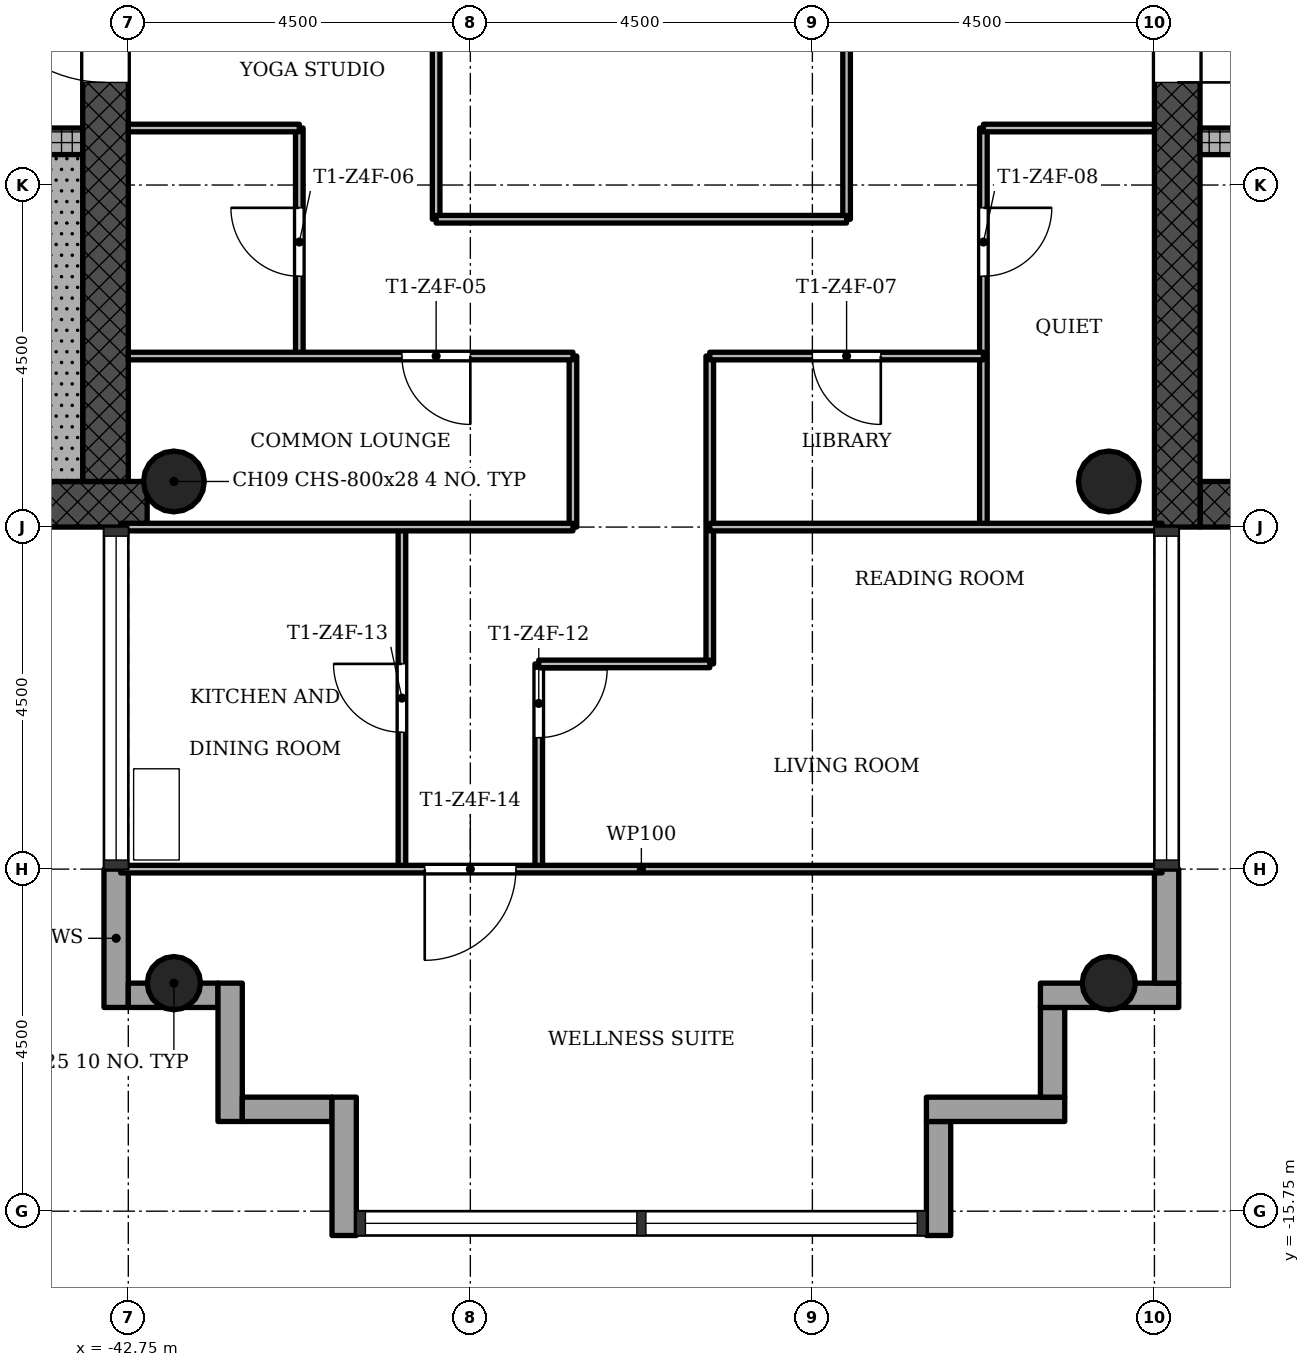
"""IFC4 building model, lengths in metres.
Left out: names, types, materials, properties, quantities, classifications, styles, units other than length and angle.
Written with IfcOpenShell. Run it as: python <this file> out.ifc"""

import sys

from ifc_helpers import new_model, si_unit, direction, frame, frame_2d, origin, origin_2d, place, context, subcontext, project, spatial, rectangle, hollow_circle, extrude, element, fill, save


model = new_model("IFC4")
c1 = context("Model", 3, precision=1e-05, world=origin(), true_north=direction((0.0, 1.0)))
c2 = subcontext(c1, "Body", "Model", "MODEL_VIEW")
j1 = project(units=[si_unit("LENGTHUNIT", "METRE"), si_unit("PLANEANGLEUNIT", "RADIAN")], contexts=[c1])
p1 = place(None, origin())
s1 = spatial("IfcSite", under=j1, at=p1, CompositionType="ELEMENT")
p2 = place(p1, origin())
s2 = spatial("IfcBuilding", under=s1, at=p2, CompositionType="ELEMENT")
p3 = place(p2, frame((0.0, 0.0, 223.2)))
s3 = spatial("IfcBuildingStorey", under=s2, at=p3, CompositionType="ELEMENT", Elevation=223.2)
p4 = place(p3, frame((-28.65, -6.45, 0.0), z_axis=(0.0, 0.0, 1.0), x_axis=(1.0, 0.0, 0.0)))
e1 = element("IfcWall", 1, at=p4, inside=s3, PredefinedType="SHEAR", context=c2, shape_type="SweptSolid", body=[
    extrude(rectangle(XDim=8.4, YDim=0.6, at=frame_2d((4.2, 0.0))), origin(), (0.0, 0.0, 1.0), 3.4),
])
p5 = place(p3, frame((-28.95, 6.15, 0.0), z_axis=(0.0, 0.0, 1.0), x_axis=(0.0, -1.0, 0.0)))
e2 = element("IfcWall", 2, at=p5, inside=s3, PredefinedType="SHEAR", context=c2, shape_type="SweptSolid", body=[
    extrude(rectangle(XDim=12.9, YDim=0.6, at=frame_2d((6.45, 0.0))), origin(), (0.0, 0.0, 1.0), 3.4),
])
p6 = place(p5, frame((5.25, 0.0, 0.0)))
e3 = element("IfcOpeningElement", 3, at=p6, cuts=e2, PredefinedType="OPENING", context=c2, shape_type="SweptSolid", body=[
    extrude(rectangle(XDim=1.8, YDim=2.1, at=frame_2d((0.9, 1.05))), frame((0.0, 0.31, 0.0), z_axis=(0.0, -1.0, 0.0), x_axis=(1.0, 0.0, 0.0)), (0.0, 0.0, 1.0), 0.62),
])
p7 = place(p3, frame((-28.65, -1.675, 0.0), z_axis=(0.0, 0.0, 1.0), x_axis=(1.0, 0.0, 0.0)))
e4 = element("IfcWall", 4, at=p7, inside=s3, PredefinedType="SHEAR", context=c2, shape_type="SweptSolid", body=[
    extrude(rectangle(XDim=7.8, YDim=0.35, at=frame_2d((3.9, 0.0))), origin(), (0.0, 0.0, 1.0), 3.4),
])
p8 = place(p7, frame((1.15, 0.0, 0.0)))
e5 = element("IfcOpeningElement", 5, at=p8, cuts=e4, PredefinedType="OPENING", context=c2, shape_type="SweptSolid", body=[
    extrude(rectangle(XDim=1.1, YDim=2.1, at=frame_2d((0.55, 1.05))), frame((0.0, 0.185, 0.0), z_axis=(0.0, -1.0, 0.0), x_axis=(1.0, 0.0, 0.0)), (0.0, 0.0, 1.0), 0.37),
])
p9 = place(p7, frame((3.35, 0.0, 0.0)))
e6 = element("IfcOpeningElement", 6, at=p9, cuts=e4, PredefinedType="OPENING", context=c2, shape_type="SweptSolid", body=[
    extrude(rectangle(XDim=1.1, YDim=2.1, at=frame_2d((0.55, 1.05))), frame((0.0, 0.185, 0.0), z_axis=(0.0, -1.0, 0.0), x_axis=(1.0, 0.0, 0.0)), (0.0, 0.0, 1.0), 0.37),
])
p10 = place(p7, frame((5.55, 0.0, 0.0)))
e7 = element("IfcOpeningElement", 7, at=p10, cuts=e4, PredefinedType="OPENING", context=c2, shape_type="SweptSolid", body=[
    extrude(rectangle(XDim=1.1, YDim=2.1, at=frame_2d((0.55, 1.05))), frame((0.0, 0.185, 0.0), z_axis=(0.0, -1.0, 0.0), x_axis=(1.0, 0.0, 0.0)), (0.0, 0.0, 1.0), 0.37),
])
p11 = place(p3, frame((-51.15, -6.45, 0.0), z_axis=(0.0, 0.0, 1.0), x_axis=(1.0, 0.0, 0.0)))
e8 = element("IfcWall", 8, at=p11, inside=s3, PredefinedType="SHEAR", context=c2, shape_type="SweptSolid", body=[
    extrude(rectangle(XDim=8.648, YDim=0.6, at=frame_2d((4.324, 0.0))), origin(), (0.0, 0.0, 1.0), 3.4),
])
p12 = place(p3, frame((-43.05, -6.15, 0.0), z_axis=(0.0, 0.0, 1.0), x_axis=(0.0, 1.0, 0.0)))
e9 = element("IfcWall", 9, at=p12, inside=s3, PredefinedType="SHEAR", context=c2, shape_type="SweptSolid", body=[
    extrude(rectangle(XDim=12.9, YDim=0.6, at=frame_2d((6.45, 0.0))), origin(), (0.0, 0.0, 1.0), 3.4),
])
p13 = place(p12, frame((5.25, 0.0, 0.0)))
e10 = element("IfcOpeningElement", 10, at=p13, cuts=e9, PredefinedType="OPENING", context=c2, shape_type="SweptSolid", body=[
    extrude(rectangle(XDim=1.8, YDim=2.1, at=frame_2d((0.9, 1.05))), frame((0.0, 0.31, 0.0), z_axis=(0.0, -1.0, 0.0), x_axis=(1.0, 0.0, 0.0)), (0.0, 0.0, 1.0), 0.62),
])
p14 = place(p3, frame((-51.15, -1.675, 0.0), z_axis=(0.0, 0.0, 1.0), x_axis=(1.0, 0.0, 0.0)))
e11 = element("IfcWall", 11, at=p14, inside=s3, PredefinedType="SHEAR", context=c2, shape_type="SweptSolid", body=[
    extrude(rectangle(XDim=7.8, YDim=0.35, at=frame_2d((3.9, 0.0))), origin(), (0.0, 0.0, 1.0), 3.4),
])
p15 = place(p14, frame((5.85, 0.0, 0.0)))
e12 = element("IfcOpeningElement", 12, at=p15, cuts=e11, PredefinedType="OPENING", context=c2, shape_type="SweptSolid", body=[
    extrude(rectangle(XDim=0.9, YDim=2.1, at=frame_2d((0.45, 1.05))), frame((0.0, 0.185, 0.0), z_axis=(0.0, -1.0, 0.0), x_axis=(1.0, 0.0, 0.0)), (0.0, 0.0, 1.0), 0.37),
])
for number, where, z_axis, x_axis in (
    (13, (-42.15, -12.75, 0.0), (0.0, 0.0, 1.0), (1.0, 0.0, 0.0)),
    (14, (-29.85, -12.75, 0.0), (0.0, 0.0, 1.0), (1.0, 0.0, 0.0)),
):
    element("IfcColumn", number, at=place(p3, frame(where, z_axis=z_axis, x_axis=x_axis)), inside=s3, PredefinedType="COLUMN", context=c2, shape_type="SweptSolid", body=[
        extrude(hollow_circle(Radius=0.35, WallThickness=0.025, at=origin_2d()), origin(), (0.0, 0.0, 1.0), 3.4),
    ])
for number, where, z_axis, x_axis in (
    (15, (-42.15, -6.15, 0.0), (0.0, 0.0, 1.0), (1.0, 0.0, 0.0)),
    (16, (-29.85, -6.15, 0.0), (0.0, 0.0, 1.0), (1.0, 0.0, 0.0)),
):
    element("IfcColumn", number, at=place(p3, frame(where, z_axis=z_axis, x_axis=x_axis)), inside=s3, PredefinedType="COLUMN", context=c2, shape_type="SweptSolid", body=[
        extrude(hollow_circle(Radius=0.4, WallThickness=0.028, at=origin_2d()), origin(), (0.0, 0.0, 1.0), 3.4),
    ])
p16 = place(p3, frame((-42.91, -11.25, -0.3), z_axis=(0.0, 0.0, 1.0), x_axis=(0.0, -1.0, 0.0)))
e17 = element("IfcWall", 17, at=p16, inside=s3, PredefinedType="STANDARD", context=c2, shape_type="SweptSolid", body=[
    extrude(rectangle(XDim=1.82, YDim=0.32, at=frame_2d((0.91, 0.0))), origin(), (0.0, 0.0, 1.0), 3.4),
])
p17 = place(p3, frame((-42.75, -12.91, -0.3), z_axis=(0.0, 0.0, 1.0), x_axis=(1.0, 0.0, 0.0)))
e18 = element("IfcWall", 18, at=p17, inside=s3, PredefinedType="STANDARD", context=c2, shape_type="SweptSolid", body=[
    extrude(rectangle(XDim=1.18, YDim=0.32, at=frame_2d((0.59, 0.0))), origin(), (0.0, 0.0, 1.0), 3.4),
])
p18 = place(p3, frame((-41.41, -12.75, -0.3), z_axis=(0.0, 0.0, 1.0), x_axis=(0.0, -1.0, 0.0)))
e19 = element("IfcWall", 19, at=p18, inside=s3, PredefinedType="STANDARD", context=c2, shape_type="SweptSolid", body=[
    extrude(rectangle(XDim=1.82, YDim=0.32, at=frame_2d((0.91, 0.0))), origin(), (0.0, 0.0, 1.0), 3.4),
])
p19 = place(p3, frame((-41.25, -14.41, -0.3), z_axis=(0.0, 0.0, 1.0), x_axis=(1.0, 0.0, 0.0)))
e20 = element("IfcWall", 20, at=p19, inside=s3, PredefinedType="STANDARD", context=c2, shape_type="SweptSolid", body=[
    extrude(rectangle(XDim=1.18, YDim=0.32, at=frame_2d((0.59, 0.0))), origin(), (0.0, 0.0, 1.0), 3.4),
])
p20 = place(p3, frame((-39.91, -14.25, -0.3), z_axis=(0.0, 0.0, 1.0), x_axis=(0.0, -1.0, 0.0)))
e21 = element("IfcWall", 21, at=p20, inside=s3, PredefinedType="STANDARD", context=c2, shape_type="SweptSolid", body=[
    extrude(rectangle(XDim=1.82, YDim=0.32, at=frame_2d((0.91, 0.0))), origin(), (0.0, 0.0, 1.0), 3.4),
])
p21 = place(p3, frame((-32.09, -16.07, -0.3), z_axis=(0.0, 0.0, 1.0), x_axis=(0.0, 1.0, 0.0)))
e22 = element("IfcWall", 22, at=p21, inside=s3, PredefinedType="STANDARD", context=c2, shape_type="SweptSolid", body=[
    extrude(rectangle(XDim=1.5, YDim=0.32, at=frame_2d((0.75, 0.0))), origin(), (0.0, 0.0, 1.0), 3.4),
])
p22 = place(p3, frame((-32.25, -14.41, -0.3), z_axis=(0.0, 0.0, 1.0), x_axis=(1.0, 0.0, 0.0)))
e23 = element("IfcWall", 23, at=p22, inside=s3, PredefinedType="STANDARD", context=c2, shape_type="SweptSolid", body=[
    extrude(rectangle(XDim=1.82, YDim=0.32, at=frame_2d((0.91, 0.0))), origin(), (0.0, 0.0, 1.0), 3.4),
])
p23 = place(p3, frame((-30.59, -14.25, -0.3), z_axis=(0.0, 0.0, 1.0), x_axis=(0.0, 1.0, 0.0)))
e24 = element("IfcWall", 24, at=p23, inside=s3, PredefinedType="STANDARD", context=c2, shape_type="SweptSolid", body=[
    extrude(rectangle(XDim=1.18, YDim=0.32, at=frame_2d((0.59, 0.0))), origin(), (0.0, 0.0, 1.0), 3.4),
])
p24 = place(p3, frame((-30.75, -12.91, -0.3), z_axis=(0.0, 0.0, 1.0), x_axis=(1.0, 0.0, 0.0)))
e25 = element("IfcWall", 25, at=p24, inside=s3, PredefinedType="STANDARD", context=c2, shape_type="SweptSolid", body=[
    extrude(rectangle(XDim=1.82, YDim=0.32, at=frame_2d((0.91, 0.0))), origin(), (0.0, 0.0, 1.0), 3.4),
])
p25 = place(p3, frame((-29.09, -12.75, -0.3), z_axis=(0.0, 0.0, 1.0), x_axis=(0.0, 1.0, 0.0)))
e26 = element("IfcWall", 26, at=p25, inside=s3, PredefinedType="STANDARD", context=c2, shape_type="SweptSolid", body=[
    extrude(rectangle(XDim=1.5, YDim=0.32, at=frame_2d((0.75, 0.0))), origin(), (0.0, 0.0, 1.0), 3.4),
])
p26 = place(p3, frame((-40.5, -4.5, 0.0), z_axis=(0.0, 0.0, 1.0), x_axis=(0.0, 1.0, 0.0)))
e27 = element("IfcWall", 27, at=p26, inside=s3, PredefinedType="PARTITIONING", context=c2, shape_type="SweptSolid", body=[
    extrude(rectangle(XDim=3.0, YDim=0.1, at=frame_2d((1.5, 0.0))), origin(), (0.0, 0.0, 1.0), 3.0),
])
p27 = place(p26, frame((1.05, 0.0, 0.0)))
e28 = element("IfcOpeningElement", 28, at=p27, cuts=e27, PredefinedType="OPENING", context=c2, shape_type="SweptSolid", body=[
    extrude(rectangle(XDim=0.9, YDim=2.1, at=frame_2d((0.45, 1.05))), frame((0.0, 0.06, 0.0), z_axis=(0.0, -1.0, 0.0), x_axis=(1.0, 0.0, 0.0)), (0.0, 0.0, 1.0), 0.12),
])
p28 = place(p3, frame((-39.15, -11.25, 0.0), z_axis=(0.0, 0.0, 1.0), x_axis=(0.0, 1.0, 0.0)))
e29 = element("IfcWall", 29, at=p28, inside=s3, PredefinedType="PARTITIONING", context=c2, shape_type="SweptSolid", body=[
    extrude(rectangle(XDim=4.5, YDim=0.1, at=frame_2d((2.25, 0.0))), origin(), (0.0, 0.0, 1.0), 3.0),
])
p29 = place(p28, frame((1.8, 0.0, 0.0)))
e30 = element("IfcOpeningElement", 30, at=p29, cuts=e29, PredefinedType="OPENING", context=c2, shape_type="SweptSolid", body=[
    extrude(rectangle(XDim=0.9, YDim=2.1, at=frame_2d((0.45, 1.05))), frame((0.0, 0.06, 0.0), z_axis=(0.0, -1.0, 0.0), x_axis=(1.0, 0.0, 0.0)), (0.0, 0.0, 1.0), 0.12),
])
p30 = place(p3, frame((-38.7, -2.7, 0.0), z_axis=(0.0, 0.0, 1.0), x_axis=(0.0, 1.0, 0.0)))
e31 = element("IfcWall", 31, at=p30, inside=s3, PredefinedType="PARTITIONING", context=c2, shape_type="SweptSolid", body=[
    extrude(rectangle(XDim=5.4, YDim=0.1, at=frame_2d((2.7, 0.0))), origin(), (0.0, 0.0, 1.0), 3.0),
])
p31 = place(p3, frame((-37.35, -11.25, 0.0), z_axis=(0.0, 0.0, 1.0), x_axis=(0.0, 1.0, 0.0)))
e32 = element("IfcWall", 32, at=p31, inside=s3, PredefinedType="PARTITIONING", context=c2, shape_type="SweptSolid", body=[
    extrude(rectangle(XDim=2.7, YDim=0.1, at=frame_2d((1.35, 0.0))), origin(), (0.0, 0.0, 1.0), 3.0),
])
p32 = place(p31, frame((1.73, 0.0, 0.0)))
e33 = element("IfcOpeningElement", 33, at=p32, cuts=e32, PredefinedType="OPENING", context=c2, shape_type="SweptSolid", body=[
    extrude(rectangle(XDim=0.9, YDim=2.1, at=frame_2d((0.45, 1.05))), frame((0.0, 0.06, 0.0), z_axis=(0.0, -1.0, 0.0), x_axis=(1.0, 0.0, 0.0)), (0.0, 0.0, 1.0), 0.12),
])
p33 = place(p3, frame((-36.9, -6.75, 0.0), z_axis=(0.0, 0.0, 1.0), x_axis=(0.0, 1.0, 0.0)))
e34 = element("IfcWall", 34, at=p33, inside=s3, PredefinedType="PARTITIONING", context=c2, shape_type="SweptSolid", body=[
    extrude(rectangle(XDim=2.25, YDim=0.1, at=frame_2d((1.125, 0.0))), origin(), (0.0, 0.0, 1.0), 3.0),
])
p34 = place(p3, frame((-35.1, -8.55, 0.0), z_axis=(0.0, 0.0, 1.0), x_axis=(0.0, 1.0, 0.0)))
e35 = element("IfcWall", 35, at=p34, inside=s3, PredefinedType="PARTITIONING", context=c2, shape_type="SweptSolid", body=[
    extrude(rectangle(XDim=4.05, YDim=0.1, at=frame_2d((2.025, 0.0))), origin(), (0.0, 0.0, 1.0), 3.0),
])
p35 = place(p3, frame((-33.3, -2.7, 0.0), z_axis=(0.0, 0.0, 1.0), x_axis=(0.0, 1.0, 0.0)))
e36 = element("IfcWall", 36, at=p35, inside=s3, PredefinedType="PARTITIONING", context=c2, shape_type="SweptSolid", body=[
    extrude(rectangle(XDim=5.4, YDim=0.1, at=frame_2d((2.7, 0.0))), origin(), (0.0, 0.0, 1.0), 3.0),
])
p36 = place(p3, frame((-31.5, -6.75, 0.0), z_axis=(0.0, 0.0, 1.0), x_axis=(0.0, 1.0, 0.0)))
e37 = element("IfcWall", 37, at=p36, inside=s3, PredefinedType="PARTITIONING", context=c2, shape_type="SweptSolid", body=[
    extrude(rectangle(XDim=5.25, YDim=0.1, at=frame_2d((2.625, 0.0))), origin(), (0.0, 0.0, 1.0), 3.0),
])
p37 = place(p36, frame((3.3, 0.0, 0.0)))
e38 = element("IfcOpeningElement", 38, at=p37, cuts=e37, PredefinedType="OPENING", context=c2, shape_type="SweptSolid", body=[
    extrude(rectangle(XDim=0.9, YDim=2.1, at=frame_2d((0.45, 1.05))), frame((0.0, 0.06, 0.0), z_axis=(0.0, -1.0, 0.0), x_axis=(1.0, 0.0, 0.0)), (0.0, 0.0, 1.0), 0.12),
])
p38 = place(p3, frame((-42.85, -11.25, 0.0), z_axis=(0.0, 0.0, 1.0), x_axis=(1.0, 0.0, 0.0)))
e39 = element("IfcWall", 39, at=p38, inside=s3, PredefinedType="PARTITIONING", context=c2, shape_type="SweptSolid", body=[
    extrude(rectangle(XDim=13.7, YDim=0.1, at=frame_2d((6.85, 0.0))), origin(), (0.0, 0.0, 1.0), 3.0),
])
p39 = place(p38, frame((4.0, 0.0, 0.0)))
e40 = element("IfcOpeningElement", 40, at=p39, cuts=e39, PredefinedType="OPENING", context=c2, shape_type="SweptSolid", body=[
    extrude(rectangle(XDim=1.2, YDim=2.1, at=frame_2d((0.6, 1.05))), frame((0.0, 0.06, 0.0), z_axis=(0.0, -1.0, 0.0), x_axis=(1.0, 0.0, 0.0)), (0.0, 0.0, 1.0), 0.12),
])
p40 = place(p3, frame((-37.35, -8.55, 0.0), z_axis=(0.0, 0.0, 1.0), x_axis=(1.0, 0.0, 0.0)))
e41 = element("IfcWall", 41, at=p40, inside=s3, PredefinedType="PARTITIONING", context=c2, shape_type="SweptSolid", body=[
    extrude(rectangle(XDim=2.25, YDim=0.1, at=frame_2d((1.125, 0.0))), origin(), (0.0, 0.0, 1.0), 3.0),
])
for number, where, z_axis, x_axis in (
    (42, (-42.85, -6.75, 0.0), (0.0, 0.0, 1.0), (1.0, 0.0, 0.0)),
    (43, (-35.1, -6.75, 0.0), (0.0, 0.0, 1.0), (1.0, 0.0, 0.0)),
):
    element("IfcWall", number, at=place(p3, frame(where, z_axis=z_axis, x_axis=x_axis)), inside=s3, PredefinedType="PARTITIONING", context=c2, shape_type="SweptSolid", body=[
        extrude(rectangle(XDim=5.95, YDim=0.1, at=frame_2d((2.975, 0.0))), origin(), (0.0, 0.0, 1.0), 3.0),
    ])
p41 = place(p3, frame((-42.75, -4.5, 0.0), z_axis=(0.0, 0.0, 1.0), x_axis=(1.0, 0.0, 0.0)))
e44 = element("IfcWall", 44, at=p41, inside=s3, PredefinedType="PARTITIONING", context=c2, shape_type="SweptSolid", body=[
    extrude(rectangle(XDim=5.85, YDim=0.1, at=frame_2d((2.925, 0.0))), origin(), (0.0, 0.0, 1.0), 3.0),
])
p42 = place(p41, frame((3.6, 0.0, 0.0)))
e45 = element("IfcOpeningElement", 45, at=p42, cuts=e44, PredefinedType="OPENING", context=c2, shape_type="SweptSolid", body=[
    extrude(rectangle(XDim=0.9, YDim=2.1, at=frame_2d((0.45, 1.05))), frame((0.0, 0.06, 0.0), z_axis=(0.0, -1.0, 0.0), x_axis=(1.0, 0.0, 0.0)), (0.0, 0.0, 1.0), 0.12),
])
p43 = place(p3, frame((-35.1, -4.5, 0.0), z_axis=(0.0, 0.0, 1.0), x_axis=(1.0, 0.0, 0.0)))
e46 = element("IfcWall", 46, at=p43, inside=s3, PredefinedType="PARTITIONING", context=c2, shape_type="SweptSolid", body=[
    extrude(rectangle(XDim=3.6, YDim=0.1, at=frame_2d((1.8, 0.0))), origin(), (0.0, 0.0, 1.0), 3.0),
])
p44 = place(p43, frame((1.35, 0.0, 0.0)))
e47 = element("IfcOpeningElement", 47, at=p44, cuts=e46, PredefinedType="OPENING", context=c2, shape_type="SweptSolid", body=[
    extrude(rectangle(XDim=0.9, YDim=2.1, at=frame_2d((0.45, 1.05))), frame((0.0, 0.06, 0.0), z_axis=(0.0, -1.0, 0.0), x_axis=(1.0, 0.0, 0.0)), (0.0, 0.0, 1.0), 0.12),
])
p45 = place(p3, frame((-38.7, -2.7, 0.0), z_axis=(0.0, 0.0, 1.0), x_axis=(1.0, 0.0, 0.0)))
e48 = element("IfcWall", 48, at=p45, inside=s3, PredefinedType="PARTITIONING", context=c2, shape_type="SweptSolid", body=[
    extrude(rectangle(XDim=5.4, YDim=0.1, at=frame_2d((2.7, 0.0))), origin(), (0.0, 0.0, 1.0), 3.0),
])
for number, where, z_axis, x_axis in (
    (49, (-42.75, -1.5, 0.0), (0.0, 0.0, 1.0), (1.0, 0.0, 0.0)),
    (50, (-31.5, -1.5, 0.0), (0.0, 0.0, 1.0), (1.0, 0.0, 0.0)),
):
    element("IfcWall", number, at=place(p3, frame(where, z_axis=z_axis, x_axis=x_axis)), inside=s3, PredefinedType="PARTITIONING", context=c2, shape_type="SweptSolid", body=[
        extrude(rectangle(XDim=2.25, YDim=0.1, at=frame_2d((1.125, 0.0))), origin(), (0.0, 0.0, 1.0), 3.0),
    ])
p46 = place(p3, frame((-43.65, -1.85, 0.0), z_axis=(0.0, 0.0, 1.0), x_axis=(0.0, -1.0, 0.0)))
e51 = element("IfcWall", 51, at=p46, inside=s3, PredefinedType="SHEAR", context=c2, shape_type="SweptSolid", body=[
    extrude(rectangle(XDim=4.3, YDim=0.6, at=frame_2d((2.15, 0.0))), origin(), (0.0, 0.0, 1.0), 3.4),
])
p47 = place(p42, origin())
e52 = element("IfcDoor", 52, at=p47, inside=s3, OperationType="SINGLE_SWING_RIGHT", PredefinedType="DOOR", context=c2, shape_type="SweptSolid", body=[
    extrude(rectangle(XDim=0.9, YDim=2.1, at=frame_2d((0.45, 1.05))), frame((0.0, 0.025, 0.0), z_axis=(0.0, -1.0, 0.0), x_axis=(1.0, 0.0, 0.0)), (0.0, 0.0, 1.0), 0.05),
])
fill(e45, e52)
p48 = place(p27, origin())
e53 = element("IfcDoor", 53, at=p48, inside=s3, OperationType="SINGLE_SWING_LEFT", PredefinedType="DOOR", context=c2, shape_type="SweptSolid", body=[
    extrude(rectangle(XDim=0.9, YDim=2.1, at=frame_2d((0.45, 1.05))), frame((0.0, 0.025, 0.0), z_axis=(0.0, -1.0, 0.0), x_axis=(1.0, 0.0, 0.0)), (0.0, 0.0, 1.0), 0.05),
])
fill(e28, e53)
p49 = place(p44, origin())
e54 = element("IfcDoor", 54, at=p49, inside=s3, OperationType="SINGLE_SWING_RIGHT", PredefinedType="DOOR", context=c2, shape_type="SweptSolid", body=[
    extrude(rectangle(XDim=0.9, YDim=2.1, at=frame_2d((0.45, 1.05))), frame((0.0, 0.025, 0.0), z_axis=(0.0, -1.0, 0.0), x_axis=(1.0, 0.0, 0.0)), (0.0, 0.0, 1.0), 0.05),
])
fill(e47, e54)
p50 = place(p37, origin())
e55 = element("IfcDoor", 55, at=p50, inside=s3, OperationType="SINGLE_SWING_RIGHT", PredefinedType="DOOR", context=c2, shape_type="SweptSolid", body=[
    extrude(rectangle(XDim=0.9, YDim=2.1, at=frame_2d((0.45, 1.05))), frame((0.0, 0.025, 0.0), z_axis=(0.0, -1.0, 0.0), x_axis=(1.0, 0.0, 0.0)), (0.0, 0.0, 1.0), 0.05),
])
fill(e38, e55)
p51 = place(p32, origin())
e56 = element("IfcDoor", 56, at=p51, inside=s3, OperationType="SINGLE_SWING_RIGHT", PredefinedType="DOOR", context=c2, shape_type="SweptSolid", body=[
    extrude(rectangle(XDim=0.9, YDim=2.1, at=frame_2d((0.45, 1.05))), frame((0.0, 0.025, 0.0), z_axis=(0.0, -1.0, 0.0), x_axis=(1.0, 0.0, 0.0)), (0.0, 0.0, 1.0), 0.05),
])
fill(e33, e56)
p52 = place(p29, origin())
e57 = element("IfcDoor", 57, at=p52, inside=s3, OperationType="SINGLE_SWING_LEFT", PredefinedType="DOOR", context=c2, shape_type="SweptSolid", body=[
    extrude(rectangle(XDim=0.9, YDim=2.1, at=frame_2d((0.45, 1.05))), frame((0.0, 0.025, 0.0), z_axis=(0.0, -1.0, 0.0), x_axis=(1.0, 0.0, 0.0)), (0.0, 0.0, 1.0), 0.05),
])
fill(e30, e57)
p53 = place(p39, origin())
e58 = element("IfcDoor", 58, at=p53, inside=s3, OperationType="SINGLE_SWING_LEFT", PredefinedType="DOOR", context=c2, shape_type="SweptSolid", body=[
    extrude(rectangle(XDim=1.2, YDim=2.1, at=frame_2d((0.6, 1.05))), frame((0.0, 0.025, 0.0), z_axis=(0.0, -1.0, 0.0), x_axis=(1.0, 0.0, 0.0)), (0.0, 0.0, 1.0), 0.05),
])
fill(e40, e58)
p54 = place(p6, origin())
e59 = element("IfcDoor", 59, at=p54, inside=s3, OperationType="SINGLE_SWING_LEFT", PredefinedType="DOOR", context=c2, shape_type="SweptSolid", body=[
    extrude(rectangle(XDim=1.8, YDim=2.1, at=frame_2d((0.9, 1.05))), frame((0.0, 0.025, 0.0), z_axis=(0.0, -1.0, 0.0), x_axis=(1.0, 0.0, 0.0)), (0.0, 0.0, 1.0), 0.05),
])
fill(e3, e59)
p55 = place(p13, origin())
e60 = element("IfcDoor", 60, at=p55, inside=s3, OperationType="SINGLE_SWING_LEFT", PredefinedType="DOOR", context=c2, shape_type="SweptSolid", body=[
    extrude(rectangle(XDim=1.8, YDim=2.1, at=frame_2d((0.9, 1.05))), frame((0.0, 0.025, 0.0), z_axis=(0.0, -1.0, 0.0), x_axis=(1.0, 0.0, 0.0)), (0.0, 0.0, 1.0), 0.05),
])
fill(e10, e60)
save(model, sys.argv[1])
